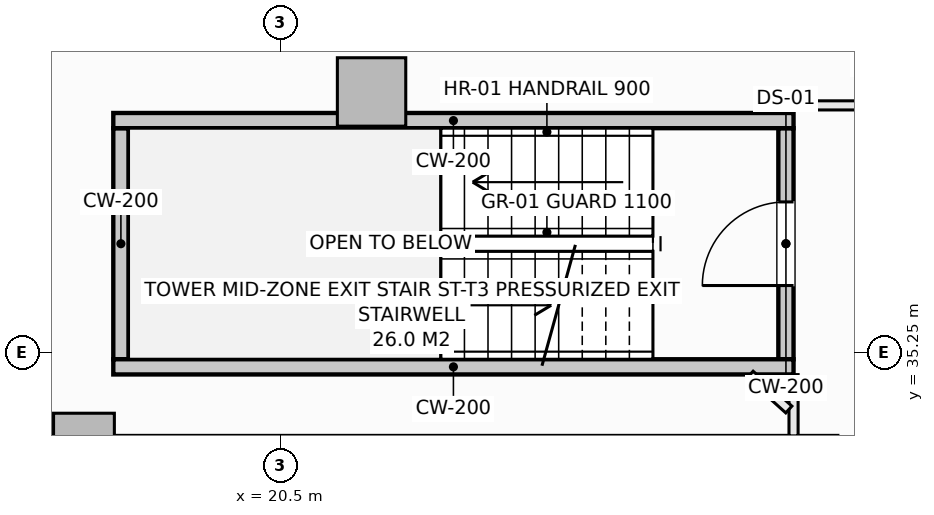
"""IFC4 building model, lengths in metres.
Left out: names, types, materials, properties, quantities, classifications, styles, units other than length and angle.
Written with IfcOpenShell. Run it as: python <this file> out.ifc"""

import sys

from ifc_helpers import new_model, si_unit, direction, frame, frame_2d, origin, origin_2d, place, context, subcontext, project, spatial, rectangle, extrude, element, fill, save


model = new_model("IFC4")
c1 = context("Model", 3, precision=1e-05, world=origin(), true_north=direction((0.0, 1.0)))
c2 = subcontext(c1, "Body", "Model", "MODEL_VIEW")
j1 = project(units=[si_unit("LENGTHUNIT", "METRE"), si_unit("PLANEANGLEUNIT", "RADIAN")], contexts=[c1])
p1 = place(None, origin())
s1 = spatial("IfcSite", under=j1, at=p1, CompositionType="ELEMENT")
p2 = place(p1, origin())
s2 = spatial("IfcBuilding", under=s1, at=p2, CompositionType="ELEMENT")
p3 = place(p2, frame((0.0, 0.0, 146.1)))
s3 = spatial("IfcBuildingStorey", under=s2, at=p3, CompositionType="ELEMENT", Elevation=146.1)
p4 = place(p3, frame((21.698, 38.677, -0.27), z_axis=(0.0, 0.0, 1.0), x_axis=(1.0, 0.0, 0.0)))
e1 = element("IfcColumn", 1, at=p4, inside=s3, PredefinedType="COLUMN", context=c2, shape_type="SweptSolid", body=[
    extrude(rectangle(XDim=0.9, YDim=0.9, at=origin_2d()), origin(), (0.0, 0.0, 1.0), 3.4),
])
p5 = place(p3, frame((17.914, 34.05, -0.27), z_axis=(0.0, 0.0, 1.0), x_axis=(1.0, 0.0, 0.0)))
e2 = element("IfcColumn", 2, at=p5, inside=s3, PredefinedType="PILASTER", context=c2, shape_type="SweptSolid", body=[
    extrude(rectangle(XDim=0.8, YDim=0.8, at=origin_2d()), origin(), (0.0, 0.0, 1.0), 3.4),
])
p6 = place(p3, frame((15.937, 38.086, 0.0), z_axis=(0.0, 0.0, 1.0), x_axis=(0.616429245738, 0.787410302828, 0.0)))
e3 = element("IfcWall", 3, at=p6, inside=s3, PredefinedType="SOLIDWALL", context=c2, shape_type="SweptSolid", body=[
    extrude(rectangle(XDim=5.223, YDim=0.3, at=frame_2d((2.612, 0.0))), origin(), (0.0, 0.0, 1.0), 2.653),
])
p7 = place(p6, frame((1.562, 0.0, 0.74)))
e4 = element("IfcOpeningElement", 4, at=p7, cuts=e3, PredefinedType="OPENING", context=c2, shape_type="SweptSolid", body=[
    extrude(rectangle(XDim=2.1, YDim=1.7, at=frame_2d((1.05, 0.85))), frame((0.0, 0.16, 0.0), z_axis=(0.0, -1.0, 0.0), x_axis=(1.0, 0.0, 0.0)), (0.0, 0.0, 1.0), 0.32),
])
p8 = place(p3, frame((27.15, 35.16, -0.27), z_axis=(0.0, 0.0, 1.0), x_axis=(0.0, 1.0, 0.0)))
e5 = element("IfcWall", 5, at=p8, inside=s3, PredefinedType="SHEAR", context=c2, shape_type="SweptSolid", body=[
    extrude(rectangle(XDim=3.04, YDim=0.2, at=frame_2d((1.52, 0.0))), origin(), (0.0, 0.0, 1.0), 3.4),
])
p9 = place(p8, frame((0.97, 0.0, 0.27)))
e6 = element("IfcOpeningElement", 6, at=p9, cuts=e5, PredefinedType="OPENING", context=c2, shape_type="SweptSolid", body=[
    extrude(rectangle(XDim=1.1, YDim=2.15, at=frame_2d((0.55, 1.075))), frame((0.0, 0.11, 0.0), z_axis=(0.0, -1.0, 0.0), x_axis=(1.0, 0.0, 0.0)), (0.0, 0.0, 1.0), 0.22),
])
p10 = place(p3, frame((18.4, 35.16, -0.27), z_axis=(0.0, 0.0, 1.0), x_axis=(0.0, 1.0, 0.0)))
e7 = element("IfcWall", 7, at=p10, inside=s3, PredefinedType="SHEAR", context=c2, shape_type="SweptSolid", body=[
    extrude(rectangle(XDim=3.04, YDim=0.2, at=frame_2d((1.52, 0.0))), origin(), (0.0, 0.0, 1.0), 3.4),
])
for number, where, z_axis, x_axis in (
    (8, (18.3, 38.3, -0.27), (0.0, 0.0, 1.0), (1.0, 0.0, 0.0)),
    (9, (18.3, 35.06, -0.27), (0.0, 0.0, 1.0), (1.0, 0.0, 0.0)),
):
    element("IfcWall", number, at=place(p3, frame(where, z_axis=z_axis, x_axis=x_axis)), inside=s3, PredefinedType="SHEAR", context=c2, shape_type="SweptSolid", body=[
        extrude(rectangle(XDim=8.95, YDim=0.2, at=frame_2d((4.475, 0.0))), origin(), (0.0, 0.0, 1.0), 3.4),
    ])
p11 = place(p3, frame((27.25, 34.152, 0.0), z_axis=(0.0, 0.0, 1.0), x_axis=(0.0, 1.0, 0.0)))
e10 = element("IfcWall", 10, at=p11, inside=s3, PredefinedType="PARTITIONING", context=c2, shape_type="SweptSolid", body=[
    extrude(rectangle(XDim=0.806, YDim=0.12, at=frame_2d((0.403, 0.0))), origin(), (0.0, 0.0, 1.0), 3.13),
])
p12 = place(p3, frame((27.25, 38.5, 0.0), z_axis=(0.0, 0.0, 1.0), x_axis=(1.0, 0.0, 0.0)))
e11 = element("IfcWall", 11, at=p12, inside=s3, PredefinedType="PARTITIONING", context=c2, shape_type="SweptSolid", body=[
    extrude(rectangle(XDim=2.53, YDim=0.12, at=frame_2d((1.265, 0.0))), origin(), (0.0, 0.0, 1.0), 3.13),
])
p13 = place(p3, frame((26.678, 34.958, 0.0), z_axis=(0.0, 0.0, 1.0), x_axis=(0.742975583244, -0.669318521112, 0.0)))
e12 = element("IfcWall", 12, at=p13, inside=s3, PredefinedType="PARTITIONING", context=c2, shape_type="SweptSolid", body=[
    extrude(rectangle(XDim=0.686, YDim=0.12, at=frame_2d((0.343, 0.0))), origin(), (0.0, 0.0, 1.0), 3.13),
])
p14 = place(p9, origin())
e13 = element("IfcDoor", 13, at=p14, inside=s3, OperationType="SINGLE_SWING_LEFT", PredefinedType="DOOR", context=c2, shape_type="SweptSolid", body=[
    extrude(rectangle(XDim=1.1, YDim=2.15, at=frame_2d((0.55, 1.075))), frame((0.0, 0.025, 0.0), z_axis=(0.0, -1.0, 0.0), x_axis=(1.0, 0.0, 0.0)), (0.0, 0.0, 1.0), 0.05),
])
fill(e6, e13)
save(model, sys.argv[1])
